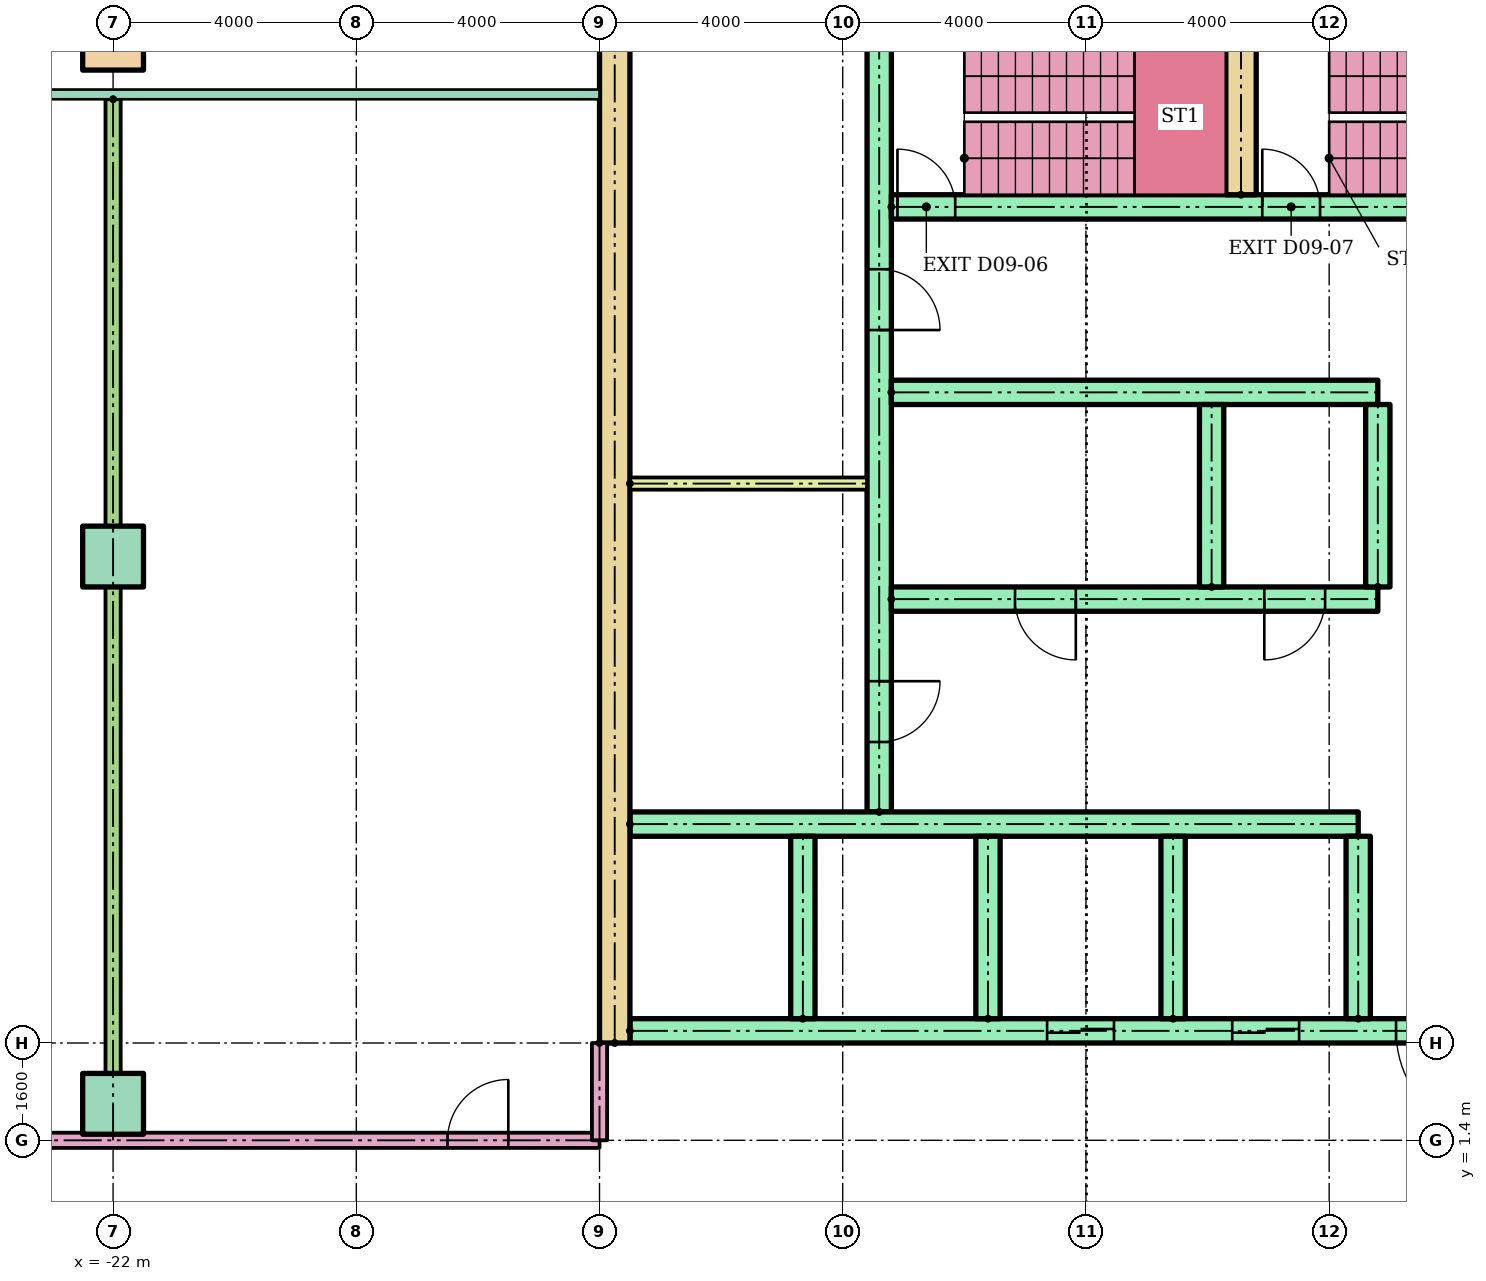
"""IFC4 building model, lengths in metres.
Left out: names, types, materials, properties, quantities, classifications, styles, units other than length and angle.
Written with IfcOpenShell. Run it as: python <this file> out.ifc"""

import sys

from ifc_helpers import new_model, si_unit, direction, frame, frame_2d, origin, origin_2d, place, context, subcontext, project, spatial, rectangle, hollow_rectangle, extrude, element, fill, save


model = new_model("IFC4")
c1 = context("Model", 3, precision=1e-05, world=origin(), true_north=direction((0.0, 1.0)))
c2 = subcontext(c1, "Body", "Model", "MODEL_VIEW")
j1 = project(units=[si_unit("LENGTHUNIT", "METRE"), si_unit("PLANEANGLEUNIT", "RADIAN")], contexts=[c1])
p1 = place(None, origin())
s1 = spatial("IfcSite", under=j1, at=p1, CompositionType="ELEMENT")
p2 = place(p1, origin())
s2 = spatial("IfcBuilding", under=s1, at=p2, CompositionType="ELEMENT")
p3 = place(p2, frame((0.0, 0.0, 37.7)))
s3 = spatial("IfcBuildingStorey", under=s2, at=p3, CompositionType="ELEMENT", Elevation=37.7)
for number, where in (
    (1, (-22.0, 2.0, 0.0)),
    (2, (-22.0, 11.0, 0.0)),
):
    element("IfcColumn", number, at=place(p3, frame(where)), inside=s3, PredefinedType="COLUMN", context=c2, shape_type="SweptSolid", body=[
        extrude(rectangle(XDim=1.0, YDim=1.0, at=origin_2d()), origin(), (0.0, 0.0, 1.0), 3.9),
    ])
p4 = place(p3, frame((-22.0, 19.5, 0.0)))
e3 = element("IfcColumn", 3, at=p4, inside=s3, PredefinedType="COLUMN", context=c2, shape_type="SweptSolid", body=[
    extrude(hollow_rectangle(XDim=1.0, YDim=1.0, WallThickness=0.05, at=origin_2d()), origin(), (0.0, 0.0, 1.0), 3.9),
])
p5 = place(p3, frame((-13.75, 3.0, 0.0), z_axis=(0.0, 0.0, 1.0), x_axis=(0.0, 1.0, 0.0)))
e4 = element("IfcWall", 4, at=p5, inside=s3, PredefinedType="SHEAR", context=c2, shape_type="SweptSolid", body=[
    extrude(rectangle(XDim=17.0, YDim=0.5, at=frame_2d((8.5, 0.0))), origin(), (0.0, 0.0, 1.0), 3.62),
])
p6 = place(p3, frame((-9.4, 6.8, 0.0), z_axis=(0.0, 0.0, 1.0), x_axis=(0.0, 1.0, 0.0)))
e5 = element("IfcWall", 5, at=p6, inside=s3, PredefinedType="SHEAR", context=c2, shape_type="SweptSolid", body=[
    extrude(rectangle(XDim=12.7, YDim=0.4, at=frame_2d((6.35, 0.0))), origin(), (0.0, 0.0, 1.0), 3.62),
])
p7 = place(p6, frame((1.15, 0.0, 0.0)))
e6 = element("IfcOpeningElement", 6, at=p7, cuts=e5, PredefinedType="OPENING", context=c2, shape_type="SweptSolid", body=[
    extrude(rectangle(XDim=1.0, YDim=2.1, at=frame_2d((0.5, 1.05))), frame((0.0, 0.21, 0.0), z_axis=(0.0, -1.0, 0.0), x_axis=(1.0, 0.0, 0.0)), (0.0, 0.0, 1.0), 0.42),
])
p8 = place(p6, frame((7.925, 0.0, 0.0)))
e7 = element("IfcOpeningElement", 7, at=p8, cuts=e5, PredefinedType="OPENING", context=c2, shape_type="SweptSolid", body=[
    extrude(rectangle(XDim=1.0, YDim=2.1, at=frame_2d((0.5, 1.05))), frame((0.0, 0.21, 0.0), z_axis=(0.0, -1.0, 0.0), x_axis=(1.0, 0.0, 0.0)), (0.0, 0.0, 1.0), 0.42),
])
p9 = place(p3, frame((-13.5, 3.2, 0.0)))
e8 = element("IfcWall", 8, at=p9, inside=s3, PredefinedType="SHEAR", context=c2, shape_type="SweptSolid", body=[
    extrude(rectangle(XDim=27.0, YDim=0.4, at=frame_2d((13.5, 0.0))), origin(), (0.0, 0.0, 1.0), 3.62),
])
p10 = place(p9, frame((6.861, 0.0, 0.0)))
e9 = element("IfcOpeningElement", 9, at=p10, cuts=e8, PredefinedType="OPENING", context=c2, shape_type="SweptSolid", body=[
    extrude(rectangle(XDim=1.1, YDim=2.1, at=frame_2d((0.55, 1.05))), frame((0.0, 0.21, 0.0), z_axis=(0.0, -1.0, 0.0), x_axis=(1.0, 0.0, 0.0)), (0.0, 0.0, 1.0), 0.42),
])
p11 = place(p9, frame((9.906, 0.0, 0.0)))
e10 = element("IfcOpeningElement", 10, at=p11, cuts=e8, PredefinedType="OPENING", context=c2, shape_type="SweptSolid", body=[
    extrude(rectangle(XDim=1.1, YDim=2.1, at=frame_2d((0.55, 1.05))), frame((0.0, 0.21, 0.0), z_axis=(0.0, -1.0, 0.0), x_axis=(1.0, 0.0, 0.0)), (0.0, 0.0, 1.0), 0.42),
])
p12 = place(p9, frame((15.994, 0.0, 0.0)))
e11 = element("IfcOpeningElement", 11, at=p12, cuts=e8, PredefinedType="OPENING", context=c2, shape_type="SweptSolid", body=[
    extrude(rectangle(XDim=1.1, YDim=2.1, at=frame_2d((0.55, 1.05))), frame((0.0, 0.21, 0.0), z_axis=(0.0, -1.0, 0.0), x_axis=(1.0, 0.0, 0.0)), (0.0, 0.0, 1.0), 0.42),
])
p13 = place(p9, frame((19.039, 0.0, 0.0)))
e12 = element("IfcOpeningElement", 12, at=p13, cuts=e8, PredefinedType="OPENING", context=c2, shape_type="SweptSolid", body=[
    extrude(rectangle(XDim=1.1, YDim=2.1, at=frame_2d((0.55, 1.05))), frame((0.0, 0.21, 0.0), z_axis=(0.0, -1.0, 0.0), x_axis=(1.0, 0.0, 0.0)), (0.0, 0.0, 1.0), 0.42),
])
p14 = place(p9, frame((12.6, 0.0, 0.0)))
e13 = element("IfcOpeningElement", 13, at=p14, cuts=e8, PredefinedType="OPENING", context=c2, shape_type="SweptSolid", body=[
    extrude(rectangle(XDim=1.8, YDim=2.1, at=frame_2d((0.9, 1.05))), frame((0.0, 0.21, 0.0), z_axis=(0.0, -1.0, 0.0), x_axis=(1.0, 0.0, 0.0)), (0.0, 0.0, 1.0), 0.42),
])
p15 = place(p3, frame((-13.5, 6.6, 0.0)))
e14 = element("IfcWall", 14, at=p15, inside=s3, PredefinedType="SHEAR", context=c2, shape_type="SweptSolid", body=[
    extrude(rectangle(XDim=11.978, YDim=0.4, at=frame_2d((5.989, 0.0))), origin(), (0.0, 0.0, 1.0), 3.62),
])
for number, where, z_axis, x_axis in (
    (15, (-10.656, 3.4, 0.0), (0.0, 0.0, 1.0), (0.0, 1.0, 0.0)),
    (16, (-7.611, 3.4, 0.0), (0.0, 0.0, 1.0), (0.0, 1.0, 0.0)),
    (17, (-4.567, 3.4, 0.0), (0.0, 0.0, 1.0), (0.0, 1.0, 0.0)),
    (18, (-1.522, 3.4, 0.0), (0.0, 0.0, 1.0), (0.0, 1.0, 0.0)),
):
    element("IfcWall", number, at=place(p3, frame(where, z_axis=z_axis, x_axis=x_axis)), inside=s3, PredefinedType="SHEAR", context=c2, shape_type="SweptSolid", body=[
        extrude(rectangle(XDim=3.0, YDim=0.4, at=frame_2d((1.5, 0.0))), origin(), (0.0, 0.0, 1.0), 3.62),
    ])
p16 = place(p3, frame((-9.2, 10.3, 0.0)))
e19 = element("IfcWall", 19, at=p16, inside=s3, PredefinedType="SHEAR", context=c2, shape_type="SweptSolid", body=[
    extrude(rectangle(XDim=8.0, YDim=0.4, at=frame_2d((4.0, 0.0))), origin(), (0.0, 0.0, 1.0), 3.62),
])
p17 = place(p16, frame((2.033, 0.0, 0.0)))
e20 = element("IfcOpeningElement", 20, at=p17, cuts=e19, PredefinedType="OPENING", context=c2, shape_type="SweptSolid", body=[
    extrude(rectangle(XDim=1.0, YDim=2.1, at=frame_2d((0.5, 1.05))), frame((0.0, 0.21, 0.0), z_axis=(0.0, -1.0, 0.0), x_axis=(1.0, 0.0, 0.0)), (0.0, 0.0, 1.0), 0.42),
])
p18 = place(p16, frame((6.133, 0.0, 0.0)))
e21 = element("IfcOpeningElement", 21, at=p18, cuts=e19, PredefinedType="OPENING", context=c2, shape_type="SweptSolid", body=[
    extrude(rectangle(XDim=1.0, YDim=2.1, at=frame_2d((0.5, 1.05))), frame((0.0, 0.21, 0.0), z_axis=(0.0, -1.0, 0.0), x_axis=(1.0, 0.0, 0.0)), (0.0, 0.0, 1.0), 0.42),
])
p19 = place(p3, frame((-9.2, 13.7, 0.0)))
e22 = element("IfcWall", 22, at=p19, inside=s3, PredefinedType="SHEAR", context=c2, shape_type="SweptSolid", body=[
    extrude(rectangle(XDim=8.0, YDim=0.4, at=frame_2d((4.0, 0.0))), origin(), (0.0, 0.0, 1.0), 3.62),
])
for number, where, z_axis, x_axis in (
    (23, (-3.933, 10.5, 0.0), (0.0, 0.0, 1.0), (0.0, 1.0, 0.0)),
    (24, (-1.2, 10.5, 0.0), (0.0, 0.0, 1.0), (0.0, 1.0, 0.0)),
):
    element("IfcWall", number, at=place(p3, frame(where, z_axis=z_axis, x_axis=x_axis)), inside=s3, PredefinedType="SHEAR", context=c2, shape_type="SweptSolid", body=[
        extrude(rectangle(XDim=3.0, YDim=0.4, at=frame_2d((1.5, 0.0))), origin(), (0.0, 0.0, 1.0), 3.62),
    ])
p20 = place(p3, frame((-9.2, 16.75, 0.0)))
e25 = element("IfcWall", 25, at=p20, inside=s3, PredefinedType="SHEAR", context=c2, shape_type="SweptSolid", body=[
    extrude(rectangle(XDim=18.4, YDim=0.4, at=frame_2d((9.2, 0.0))), origin(), (0.0, 0.0, 1.0), 3.62),
])
p21 = place(p20, frame((0.1, 0.0, 0.0)))
e26 = element("IfcOpeningElement", 26, at=p21, cuts=e25, PredefinedType="OPENING", context=c2, shape_type="SweptSolid", body=[
    extrude(rectangle(XDim=0.95, YDim=2.1, at=frame_2d((0.475, 1.05))), frame((0.0, 0.21, 0.0), z_axis=(0.0, -1.0, 0.0), x_axis=(1.0, 0.0, 0.0)), (0.0, 0.0, 1.0), 0.42),
])
p22 = place(p20, frame((6.1, 0.0, 0.0)))
e27 = element("IfcOpeningElement", 27, at=p22, cuts=e25, PredefinedType="OPENING", context=c2, shape_type="SweptSolid", body=[
    extrude(rectangle(XDim=0.95, YDim=2.1, at=frame_2d((0.475, 1.05))), frame((0.0, 0.21, 0.0), z_axis=(0.0, -1.0, 0.0), x_axis=(1.0, 0.0, 0.0)), (0.0, 0.0, 1.0), 0.42),
])
p23 = place(p20, frame((12.1, 0.0, 0.0)))
e28 = element("IfcOpeningElement", 28, at=p23, cuts=e25, PredefinedType="OPENING", context=c2, shape_type="SweptSolid", body=[
    extrude(rectangle(XDim=0.95, YDim=2.1, at=frame_2d((0.475, 1.05))), frame((0.0, 0.21, 0.0), z_axis=(0.0, -1.0, 0.0), x_axis=(1.0, 0.0, 0.0)), (0.0, 0.0, 1.0), 0.42),
])
p24 = place(p3, frame((-3.45, 16.95, 0.0), z_axis=(0.0, 0.0, 1.0), x_axis=(0.0, 1.0, 0.0)))
e29 = element("IfcWall", 29, at=p24, inside=s3, PredefinedType="SHEAR", context=c2, shape_type="SweptSolid", body=[
    extrude(rectangle(XDim=2.55, YDim=0.5, at=frame_2d((1.275, 0.0))), origin(), (0.0, 0.0, 1.0), 3.62),
])
p25 = place(p3, frame((-13.5, 12.2, 0.0)))
e30 = element("IfcWall", 30, at=p25, inside=s3, PredefinedType="PARTITIONING", context=c2, shape_type="SweptSolid", body=[
    extrude(rectangle(XDim=3.9, YDim=0.2, at=frame_2d((1.95, 0.0))), origin(), (0.0, 0.0, 1.0), 3.62),
])
p26 = place(p3, frame((-29.0, 1.4, 0.0)))
e31 = element("IfcWall", 31, at=p26, inside=s3, PredefinedType="PARTITIONING", context=c2, shape_type="SweptSolid", body=[
    extrude(rectangle(XDim=15.0, YDim=0.25, at=frame_2d((7.5, 0.0))), origin(), (0.0, 0.0, 1.0), 3.1),
])
p27 = place(p26, frame((12.5, 0.0, 0.0)))
e32 = element("IfcOpeningElement", 32, at=p27, cuts=e31, PredefinedType="OPENING", context=c2, shape_type="SweptSolid", body=[
    extrude(rectangle(XDim=1.0, YDim=2.1, at=frame_2d((0.5, 1.05))), frame((0.0, 0.135, 0.0), z_axis=(0.0, -1.0, 0.0), x_axis=(1.0, 0.0, 0.0)), (0.0, 0.0, 1.0), 0.27),
])
p28 = place(p26, frame((4.5, 0.0, 0.0)))
e33 = element("IfcOpeningElement", 33, at=p28, cuts=e31, PredefinedType="OPENING", context=c2, shape_type="SweptSolid", body=[
    extrude(rectangle(XDim=1.0, YDim=2.1, at=frame_2d((0.5, 1.05))), frame((0.0, 0.135, 0.0), z_axis=(0.0, -1.0, 0.0), x_axis=(1.0, 0.0, 0.0)), (0.0, 0.0, 1.0), 0.27),
])
p29 = place(p3, frame((-22.0, 18.521, 0.0), z_axis=(0.0, 0.0, 1.0), x_axis=(0.0, -1.0, 0.0)))
e34 = element("IfcWall", 34, at=p29, inside=s3, PredefinedType="PARTITIONING", context=c2, shape_type="SweptSolid", body=[
    extrude(rectangle(XDim=17.121, YDim=0.25, at=frame_2d((8.561, 0.0))), origin(), (0.0, 0.0, 1.0), 3.1),
])
p30 = place(p3, frame((-14.0, 3.0, 0.0), z_axis=(0.0, 0.0, 1.0), x_axis=(0.0, -1.0, 0.0)))
e35 = element("IfcWall", 35, at=p30, inside=s3, PredefinedType="PARTITIONING", context=c2, shape_type="SweptSolid", body=[
    extrude(rectangle(XDim=1.6, YDim=0.25, at=frame_2d((0.8, 0.0))), origin(), (0.0, 0.0, 1.0), 3.1),
])
p31 = place(p10, origin())
e36 = element("IfcDoor", 36, at=p31, inside=s3, OperationType="SLIDING_TO_LEFT", PredefinedType="DOOR", context=c2, shape_type="SweptSolid", body=[
    extrude(rectangle(XDim=1.1, YDim=2.1, at=frame_2d((0.55, 1.05))), frame((0.0, 0.025, 0.0), z_axis=(0.0, -1.0, 0.0), x_axis=(1.0, 0.0, 0.0)), (0.0, 0.0, 1.0), 0.05),
])
fill(e9, e36)
p32 = place(p11, origin())
e37 = element("IfcDoor", 37, at=p32, inside=s3, OperationType="SLIDING_TO_LEFT", PredefinedType="DOOR", context=c2, shape_type="SweptSolid", body=[
    extrude(rectangle(XDim=1.1, YDim=2.1, at=frame_2d((0.55, 1.05))), frame((0.0, 0.025, 0.0), z_axis=(0.0, -1.0, 0.0), x_axis=(1.0, 0.0, 0.0)), (0.0, 0.0, 1.0), 0.05),
])
fill(e10, e37)
p33 = place(p14, frame((1.8, 0.0, 0.0), z_axis=(0.0, 0.0, 1.0), x_axis=(-1.0, 0.0, 0.0)))
e38 = element("IfcDoor", 38, at=p33, inside=s3, OperationType="DOUBLE_DOOR_SINGLE_SWING", PredefinedType="DOOR", context=c2, shape_type="SweptSolid", body=[
    extrude(rectangle(XDim=1.8, YDim=2.1, at=frame_2d((0.9, 1.05))), frame((0.0, 0.025, 0.0), z_axis=(0.0, -1.0, 0.0), x_axis=(1.0, 0.0, 0.0)), (0.0, 0.0, 1.0), 0.05),
])
fill(e13, e38)
p34 = place(p17, frame((1.0, 0.0, 0.0), z_axis=(0.0, 0.0, 1.0), x_axis=(-1.0, 0.0, 0.0)))
e39 = element("IfcDoor", 39, at=p34, inside=s3, OperationType="SINGLE_SWING_RIGHT", PredefinedType="DOOR", context=c2, shape_type="SweptSolid", body=[
    extrude(rectangle(XDim=1.0, YDim=2.1, at=frame_2d((0.5, 1.05))), frame((0.0, 0.025, 0.0), z_axis=(0.0, -1.0, 0.0), x_axis=(1.0, 0.0, 0.0)), (0.0, 0.0, 1.0), 0.05),
])
fill(e20, e39)
p35 = place(p18, frame((1.0, 0.0, 0.0), z_axis=(0.0, 0.0, 1.0), x_axis=(-1.0, 0.0, 0.0)))
e40 = element("IfcDoor", 40, at=p35, inside=s3, OperationType="SINGLE_SWING_LEFT", PredefinedType="DOOR", context=c2, shape_type="SweptSolid", body=[
    extrude(rectangle(XDim=1.0, YDim=2.1, at=frame_2d((0.5, 1.05))), frame((0.0, 0.025, 0.0), z_axis=(0.0, -1.0, 0.0), x_axis=(1.0, 0.0, 0.0)), (0.0, 0.0, 1.0), 0.05),
])
fill(e21, e40)
p36 = place(p21, origin())
e41 = element("IfcDoor", 41, at=p36, inside=s3, OperationType="SINGLE_SWING_LEFT", PredefinedType="DOOR", context=c2, shape_type="SweptSolid", body=[
    extrude(rectangle(XDim=0.95, YDim=2.1, at=frame_2d((0.475, 1.05))), frame((0.0, 0.025, 0.0), z_axis=(0.0, -1.0, 0.0), x_axis=(1.0, 0.0, 0.0)), (0.0, 0.0, 1.0), 0.05),
])
fill(e26, e41)
p37 = place(p22, origin())
e42 = element("IfcDoor", 42, at=p37, inside=s3, OperationType="SINGLE_SWING_LEFT", PredefinedType="DOOR", context=c2, shape_type="SweptSolid", body=[
    extrude(rectangle(XDim=0.95, YDim=2.1, at=frame_2d((0.475, 1.05))), frame((0.0, 0.025, 0.0), z_axis=(0.0, -1.0, 0.0), x_axis=(1.0, 0.0, 0.0)), (0.0, 0.0, 1.0), 0.05),
])
fill(e27, e42)
p38 = place(p7, frame((1.0, 0.0, 0.0), z_axis=(0.0, 0.0, 1.0), x_axis=(-1.0, 0.0, 0.0)))
e43 = element("IfcDoor", 43, at=p38, inside=s3, OperationType="SINGLE_SWING_RIGHT", PredefinedType="DOOR", context=c2, shape_type="SweptSolid", body=[
    extrude(rectangle(XDim=1.0, YDim=2.1, at=frame_2d((0.5, 1.05))), frame((0.0, 0.025, 0.0), z_axis=(0.0, -1.0, 0.0), x_axis=(1.0, 0.0, 0.0)), (0.0, 0.0, 1.0), 0.05),
])
fill(e6, e43)
p39 = place(p8, frame((1.0, 0.0, 0.0), z_axis=(0.0, 0.0, 1.0), x_axis=(-1.0, 0.0, 0.0)))
e44 = element("IfcDoor", 44, at=p39, inside=s3, OperationType="SINGLE_SWING_LEFT", PredefinedType="DOOR", context=c2, shape_type="SweptSolid", body=[
    extrude(rectangle(XDim=1.0, YDim=2.1, at=frame_2d((0.5, 1.05))), frame((0.0, 0.025, 0.0), z_axis=(0.0, -1.0, 0.0), x_axis=(1.0, 0.0, 0.0)), (0.0, 0.0, 1.0), 0.05),
])
fill(e7, e44)
p40 = place(p27, origin())
e45 = element("IfcDoor", 45, at=p40, inside=s3, OperationType="SINGLE_SWING_RIGHT", PredefinedType="DOOR", context=c2, shape_type="SweptSolid", body=[
    extrude(rectangle(XDim=1.0, YDim=2.1, at=frame_2d((0.5, 1.05))), frame((0.0, 0.025, 0.0), z_axis=(0.0, -1.0, 0.0), x_axis=(1.0, 0.0, 0.0)), (0.0, 0.0, 1.0), 0.05),
])
fill(e32, e45)
save(model, sys.argv[1])
